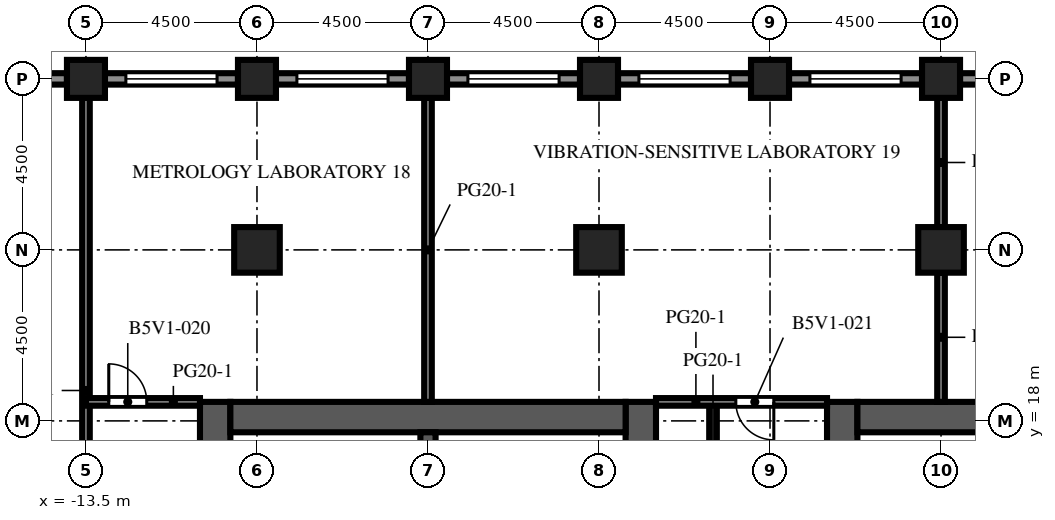
"""IFC4 building model, lengths in metres.
Left out: names, types, materials, properties, quantities, classifications, styles, units other than length and angle.
Written with IfcOpenShell. Run it as: python <this file> out.ifc"""

import sys

from ifc_helpers import new_model, si_unit, direction, frame, frame_2d, origin, origin_2d, place, context, subcontext, project, spatial, rectangle, extrude, element, fill, save


model = new_model("IFC4")
c1 = context("Model", 3, precision=1e-05, world=origin(), true_north=direction((0.0, 1.0)))
c2 = subcontext(c1, "Body", "Model", "MODEL_VIEW")
j1 = project(units=[si_unit("LENGTHUNIT", "METRE"), si_unit("PLANEANGLEUNIT", "RADIAN")], contexts=[c1])
p1 = place(None, origin())
s1 = spatial("IfcSite", under=j1, at=p1, CompositionType="ELEMENT")
p2 = place(p1, origin())
s2 = spatial("IfcBuilding", under=s1, at=p2, CompositionType="ELEMENT")
p3 = place(p2, frame((0.0, 0.0, 169.1)))
s3 = spatial("IfcBuildingStorey", under=s2, at=p3, CompositionType="ELEMENT", Elevation=169.1)
for number, where, z_axis, x_axis in (
    (1, (-13.5, 27.0, 0.0), (0.0, 0.0, 1.0), (1.0, 0.0, 0.0)),
    (2, (-9.0, 27.0, 0.0), (0.0, 0.0, 1.0), (1.0, 0.0, 0.0)),
    (3, (-4.5, 27.0, 0.0), (0.0, 0.0, 1.0), (1.0, 0.0, 0.0)),
    (4, (0.0, 27.0, 0.0), (0.0, 0.0, 1.0), (1.0, 0.0, 0.0)),
    (5, (4.5, 27.0, 0.0), (0.0, 0.0, 1.0), (1.0, 0.0, 0.0)),
    (6, (9.0, 27.0, 0.0), (0.0, 0.0, 1.0), (1.0, 0.0, 0.0)),
):
    element("IfcColumn", number, at=place(p3, frame(where, z_axis=z_axis, x_axis=x_axis)), inside=s3, PredefinedType="COLUMN", context=c2, shape_type="SweptSolid", body=[
        extrude(rectangle(XDim=1.0, YDim=1.0, at=origin_2d()), origin(), (0.0, 0.0, 1.0), 4.1),
    ])
for number, where, z_axis, x_axis in (
    (7, (-9.0, 22.5, 0.0), (0.0, 0.0, 1.0), (1.0, 0.0, 0.0)),
    (8, (0.0, 22.5, 0.0), (0.0, 0.0, 1.0), (1.0, 0.0, 0.0)),
    (9, (9.0, 22.5, 0.0), (0.0, 0.0, 1.0), (1.0, 0.0, 0.0)),
):
    element("IfcColumn", number, at=place(p3, frame(where, z_axis=z_axis, x_axis=x_axis)), inside=s3, PredefinedType="COLUMN", context=c2, shape_type="SweptSolid", body=[
        extrude(rectangle(XDim=1.2, YDim=1.2, at=origin_2d()), origin(), (0.0, 0.0, 1.0), 4.1),
    ])
p4 = place(p3, frame((-10.1, -9.0, 0.0), z_axis=(0.0, 0.0, 1.0), x_axis=(0.0, 1.0, 0.0)))
e10 = element("IfcWall", 10, at=p4, inside=s3, PredefinedType="SHEAR", context=c2, shape_type="SweptSolid", body=[
    extrude(rectangle(XDim=27.5, YDim=0.8, at=frame_2d((13.75, 0.0))), origin(), (0.0, 0.0, 1.0), 4.1),
])
p5 = place(p4, frame((12.55, 0.0, 0.0)))
e11 = element("IfcOpeningElement", 11, at=p5, cuts=e10, PredefinedType="OPENING", context=c2, shape_type="SweptSolid", body=[
    extrude(rectangle(XDim=2.4, YDim=2.4, at=frame_2d((1.2, 1.2))), frame((0.0, 0.41, 0.0), z_axis=(0.0, -1.0, 0.0), x_axis=(1.0, 0.0, 0.0)), (0.0, 0.0, 1.0), 0.82),
])
p6 = place(p4, frame((6.825, 0.0, 0.0)))
e12 = element("IfcOpeningElement", 12, at=p6, cuts=e10, PredefinedType="OPENING", context=c2, shape_type="SweptSolid", body=[
    extrude(rectangle(XDim=1.2, YDim=2.1, at=frame_2d((0.6, 1.05))), frame((0.0, 0.41, 0.0), z_axis=(0.0, -1.0, 0.0), x_axis=(1.0, 0.0, 0.0)), (0.0, 0.0, 1.0), 0.82),
])
p7 = place(p4, frame((19.475, 0.0, 0.0)))
e13 = element("IfcOpeningElement", 13, at=p7, cuts=e10, PredefinedType="OPENING", context=c2, shape_type="SweptSolid", body=[
    extrude(rectangle(XDim=1.2, YDim=2.1, at=frame_2d((0.6, 1.05))), frame((0.0, 0.41, 0.0), z_axis=(0.0, -1.0, 0.0), x_axis=(1.0, 0.0, 0.0)), (0.0, 0.0, 1.0), 0.82),
])
p8 = place(p3, frame((1.1, -9.0, 0.0), z_axis=(0.0, 0.0, 1.0), x_axis=(0.0, 1.0, 0.0)))
e14 = element("IfcWall", 14, at=p8, inside=s3, PredefinedType="SHEAR", context=c2, shape_type="SweptSolid", body=[
    extrude(rectangle(XDim=27.5, YDim=0.8, at=frame_2d((13.75, 0.0))), origin(), (0.0, 0.0, 1.0), 4.1),
])
p9 = place(p8, frame((12.55, 0.0, 0.0)))
e15 = element("IfcOpeningElement", 15, at=p9, cuts=e14, PredefinedType="OPENING", context=c2, shape_type="SweptSolid", body=[
    extrude(rectangle(XDim=2.4, YDim=2.4, at=frame_2d((1.2, 1.2))), frame((0.0, 0.41, 0.0), z_axis=(0.0, -1.0, 0.0), x_axis=(1.0, 0.0, 0.0)), (0.0, 0.0, 1.0), 0.82),
])
p10 = place(p8, frame((3.95, 0.0, 0.0)))
e16 = element("IfcOpeningElement", 16, at=p10, cuts=e14, PredefinedType="OPENING", context=c2, shape_type="SweptSolid", body=[
    extrude(rectangle(XDim=1.2, YDim=2.1, at=frame_2d((0.6, 1.05))), frame((0.0, 0.41, 0.0), z_axis=(0.0, -1.0, 0.0), x_axis=(1.0, 0.0, 0.0)), (0.0, 0.0, 1.0), 0.82),
])
p11 = place(p8, frame((22.35, 0.0, 0.0)))
e17 = element("IfcOpeningElement", 17, at=p11, cuts=e14, PredefinedType="OPENING", context=c2, shape_type="SweptSolid", body=[
    extrude(rectangle(XDim=1.2, YDim=2.1, at=frame_2d((0.6, 1.05))), frame((0.0, 0.41, 0.0), z_axis=(0.0, -1.0, 0.0), x_axis=(1.0, 0.0, 0.0)), (0.0, 0.0, 1.0), 0.82),
])
p12 = place(p3, frame((-9.7, 18.1, 0.0), z_axis=(0.0, 0.0, 1.0), x_axis=(1.0, 0.0, 0.0)))
e18 = element("IfcWall", 18, at=p12, inside=s3, PredefinedType="SHEAR", context=c2, shape_type="SweptSolid", body=[
    extrude(rectangle(XDim=10.4, YDim=0.8, at=frame_2d((5.2, 0.0))), origin(), (0.0, 0.0, 1.0), 4.1),
])
p13 = place(p3, frame((-4.5, 10.2, 0.0), z_axis=(0.0, 0.0, 1.0), x_axis=(0.0, 1.0, 0.0)))
e19 = element("IfcWall", 19, at=p13, inside=s3, PredefinedType="SHEAR", context=c2, shape_type="SweptSolid", body=[
    extrude(rectangle(XDim=7.5, YDim=0.4, at=frame_2d((3.75, 0.0))), origin(), (0.0, 0.0, 1.0), 4.1),
])
p14 = place(p3, frame((6.4, -9.0, 0.0), z_axis=(0.0, 0.0, 1.0), x_axis=(0.0, 1.0, 0.0)))
e20 = element("IfcWall", 20, at=p14, inside=s3, PredefinedType="SHEAR", context=c2, shape_type="SweptSolid", body=[
    extrude(rectangle(XDim=27.5, YDim=0.8, at=frame_2d((13.75, 0.0))), origin(), (0.0, 0.0, 1.0), 4.1),
])
p15 = place(p14, frame((12.55, 0.0, 0.0)))
e21 = element("IfcOpeningElement", 21, at=p15, cuts=e20, PredefinedType="OPENING", context=c2, shape_type="SweptSolid", body=[
    extrude(rectangle(XDim=2.4, YDim=2.4, at=frame_2d((1.2, 1.2))), frame((0.0, 0.41, 0.0), z_axis=(0.0, -1.0, 0.0), x_axis=(1.0, 0.0, 0.0)), (0.0, 0.0, 1.0), 0.82),
])
p16 = place(p14, frame((3.95, 0.0, 0.0)))
e22 = element("IfcOpeningElement", 22, at=p16, cuts=e20, PredefinedType="OPENING", context=c2, shape_type="SweptSolid", body=[
    extrude(rectangle(XDim=1.2, YDim=2.1, at=frame_2d((0.6, 1.05))), frame((0.0, 0.41, 0.0), z_axis=(0.0, -1.0, 0.0), x_axis=(1.0, 0.0, 0.0)), (0.0, 0.0, 1.0), 0.82),
])
p17 = place(p14, frame((22.35, 0.0, 0.0)))
e23 = element("IfcOpeningElement", 23, at=p17, cuts=e20, PredefinedType="OPENING", context=c2, shape_type="SweptSolid", body=[
    extrude(rectangle(XDim=1.2, YDim=2.1, at=frame_2d((0.6, 1.05))), frame((0.0, 0.41, 0.0), z_axis=(0.0, -1.0, 0.0), x_axis=(1.0, 0.0, 0.0)), (0.0, 0.0, 1.0), 0.82),
])
p18 = place(p3, frame((6.8, 18.1, 0.0), z_axis=(0.0, 0.0, 1.0), x_axis=(1.0, 0.0, 0.0)))
e24 = element("IfcWall", 24, at=p18, inside=s3, PredefinedType="SHEAR", context=c2, shape_type="SweptSolid", body=[
    extrude(rectangle(XDim=10.4, YDim=0.8, at=frame_2d((5.2, 0.0))), origin(), (0.0, 0.0, 1.0), 4.1),
])
p19 = place(p3, frame((9.5, 27.0, 0.0), z_axis=(0.0, 0.0, 1.0), x_axis=(1.0, 0.0, 0.0)))
e25 = element("IfcWall", 25, at=p19, inside=s3, PredefinedType="SOLIDWALL", context=c2, shape_type="SweptSolid", body=[
    extrude(rectangle(XDim=3.5, YDim=0.3, at=frame_2d((1.75, 0.0))), origin(), (0.0, 0.0, 1.0), 2.85),
])
p20 = place(p19, frame((0.55, 0.0, 0.8)))
e26 = element("IfcOpeningElement", 26, at=p20, cuts=e25, PredefinedType="OPENING", context=c2, shape_type="SweptSolid", body=[
    extrude(rectangle(XDim=2.4, YDim=1.7, at=frame_2d((1.2, 0.85))), frame((0.0, 0.16, 0.0), z_axis=(0.0, -1.0, 0.0), x_axis=(1.0, 0.0, 0.0)), (0.0, 0.0, 1.0), 0.32),
])
p21 = place(p3, frame((5.0, 27.0, 0.0), z_axis=(0.0, 0.0, 1.0), x_axis=(1.0, 0.0, 0.0)))
e27 = element("IfcWall", 27, at=p21, inside=s3, PredefinedType="SOLIDWALL", context=c2, shape_type="SweptSolid", body=[
    extrude(rectangle(XDim=3.5, YDim=0.3, at=frame_2d((1.75, 0.0))), origin(), (0.0, 0.0, 1.0), 2.85),
])
p22 = place(p21, frame((0.55, 0.0, 0.8)))
e28 = element("IfcOpeningElement", 28, at=p22, cuts=e27, PredefinedType="OPENING", context=c2, shape_type="SweptSolid", body=[
    extrude(rectangle(XDim=2.4, YDim=1.7, at=frame_2d((1.2, 0.85))), frame((0.0, 0.16, 0.0), z_axis=(0.0, -1.0, 0.0), x_axis=(1.0, 0.0, 0.0)), (0.0, 0.0, 1.0), 0.32),
])
p23 = place(p3, frame((0.5, 27.0, 0.0), z_axis=(0.0, 0.0, 1.0), x_axis=(1.0, 0.0, 0.0)))
e29 = element("IfcWall", 29, at=p23, inside=s3, PredefinedType="SOLIDWALL", context=c2, shape_type="SweptSolid", body=[
    extrude(rectangle(XDim=3.5, YDim=0.3, at=frame_2d((1.75, 0.0))), origin(), (0.0, 0.0, 1.0), 2.85),
])
p24 = place(p23, frame((0.55, 0.0, 0.8)))
e30 = element("IfcOpeningElement", 30, at=p24, cuts=e29, PredefinedType="OPENING", context=c2, shape_type="SweptSolid", body=[
    extrude(rectangle(XDim=2.4, YDim=1.7, at=frame_2d((1.2, 0.85))), frame((0.0, 0.16, 0.0), z_axis=(0.0, -1.0, 0.0), x_axis=(1.0, 0.0, 0.0)), (0.0, 0.0, 1.0), 0.32),
])
p25 = place(p3, frame((-4.0, 27.0, 0.0), z_axis=(0.0, 0.0, 1.0), x_axis=(1.0, 0.0, 0.0)))
e31 = element("IfcWall", 31, at=p25, inside=s3, PredefinedType="SOLIDWALL", context=c2, shape_type="SweptSolid", body=[
    extrude(rectangle(XDim=3.5, YDim=0.3, at=frame_2d((1.75, 0.0))), origin(), (0.0, 0.0, 1.0), 2.85),
])
p26 = place(p25, frame((0.55, 0.0, 0.8)))
e32 = element("IfcOpeningElement", 32, at=p26, cuts=e31, PredefinedType="OPENING", context=c2, shape_type="SweptSolid", body=[
    extrude(rectangle(XDim=2.4, YDim=1.7, at=frame_2d((1.2, 0.85))), frame((0.0, 0.16, 0.0), z_axis=(0.0, -1.0, 0.0), x_axis=(1.0, 0.0, 0.0)), (0.0, 0.0, 1.0), 0.32),
])
p27 = place(p3, frame((-8.5, 27.0, 0.0), z_axis=(0.0, 0.0, 1.0), x_axis=(1.0, 0.0, 0.0)))
e33 = element("IfcWall", 33, at=p27, inside=s3, PredefinedType="SOLIDWALL", context=c2, shape_type="SweptSolid", body=[
    extrude(rectangle(XDim=3.5, YDim=0.3, at=frame_2d((1.75, 0.0))), origin(), (0.0, 0.0, 1.0), 2.85),
])
p28 = place(p27, frame((0.55, 0.0, 0.8)))
e34 = element("IfcOpeningElement", 34, at=p28, cuts=e33, PredefinedType="OPENING", context=c2, shape_type="SweptSolid", body=[
    extrude(rectangle(XDim=2.4, YDim=1.7, at=frame_2d((1.2, 0.85))), frame((0.0, 0.16, 0.0), z_axis=(0.0, -1.0, 0.0), x_axis=(1.0, 0.0, 0.0)), (0.0, 0.0, 1.0), 0.32),
])
p29 = place(p3, frame((-13.0, 27.0, 0.0), z_axis=(0.0, 0.0, 1.0), x_axis=(1.0, 0.0, 0.0)))
e35 = element("IfcWall", 35, at=p29, inside=s3, PredefinedType="SOLIDWALL", context=c2, shape_type="SweptSolid", body=[
    extrude(rectangle(XDim=3.5, YDim=0.3, at=frame_2d((1.75, 0.0))), origin(), (0.0, 0.0, 1.0), 2.85),
])
p30 = place(p29, frame((0.55, 0.0, 0.8)))
e36 = element("IfcOpeningElement", 36, at=p30, cuts=e35, PredefinedType="OPENING", context=c2, shape_type="SweptSolid", body=[
    extrude(rectangle(XDim=2.4, YDim=1.7, at=frame_2d((1.2, 0.85))), frame((0.0, 0.16, 0.0), z_axis=(0.0, -1.0, 0.0), x_axis=(1.0, 0.0, 0.0)), (0.0, 0.0, 1.0), 0.32),
])
p31 = place(p3, frame((-17.5, 27.0, 0.0), z_axis=(0.0, 0.0, 1.0), x_axis=(1.0, 0.0, 0.0)))
e37 = element("IfcWall", 37, at=p31, inside=s3, PredefinedType="SOLIDWALL", context=c2, shape_type="SweptSolid", body=[
    extrude(rectangle(XDim=3.5, YDim=0.3, at=frame_2d((1.75, 0.0))), origin(), (0.0, 0.0, 1.0), 2.85),
])
p32 = place(p31, frame((1.25, 0.0, 0.0)))
e38 = element("IfcOpeningElement", 38, at=p32, cuts=e37, PredefinedType="OPENING", context=c2, shape_type="SweptSolid", body=[
    extrude(rectangle(XDim=1.0, YDim=2.2, at=frame_2d((0.5, 1.1))), frame((0.0, 0.16, 0.0), z_axis=(0.0, -1.0, 0.0), x_axis=(1.0, 0.0, 0.0)), (0.0, 0.0, 1.0), 0.32),
])
p33 = place(p3, frame((-0.7, 14.85, 0.0), z_axis=(0.0, 0.0, 1.0), x_axis=(0.0, 1.0, 0.0)))
e39 = element("IfcWall", 39, at=p33, inside=s3, PredefinedType="PARTITIONING", context=c2, shape_type="SweptSolid", body=[
    extrude(rectangle(XDim=2.85, YDim=0.1, at=frame_2d((1.425, 0.0))), origin(), (0.0, 0.0, 1.0), 3.65),
])
p34 = place(p33, frame((0.925, 0.0, 0.0)))
e40 = element("IfcOpeningElement", 40, at=p34, cuts=e39, PredefinedType="OPENING", context=c2, shape_type="SweptSolid", body=[
    extrude(rectangle(XDim=1.0, YDim=2.1, at=frame_2d((0.5, 1.05))), frame((0.0, 0.06, 0.0), z_axis=(0.0, -1.0, 0.0), x_axis=(1.0, 0.0, 0.0)), (0.0, 0.0, 1.0), 0.12),
])
p35 = place(p3, frame((8.2, 14.85, 0.0), z_axis=(0.0, 0.0, 1.0), x_axis=(0.0, 1.0, 0.0)))
e41 = element("IfcWall", 41, at=p35, inside=s3, PredefinedType="PARTITIONING", context=c2, shape_type="SweptSolid", body=[
    extrude(rectangle(XDim=2.85, YDim=0.1, at=frame_2d((1.425, 0.0))), origin(), (0.0, 0.0, 1.0), 3.65),
])
p36 = place(p35, frame((0.925, 0.0, 0.0)))
e42 = element("IfcOpeningElement", 42, at=p36, cuts=e41, PredefinedType="OPENING", context=c2, shape_type="SweptSolid", body=[
    extrude(rectangle(XDim=1.0, YDim=2.1, at=frame_2d((0.5, 1.05))), frame((0.0, 0.06, 0.0), z_axis=(0.0, -1.0, 0.0), x_axis=(1.0, 0.0, 0.0)), (0.0, 0.0, 1.0), 0.12),
])
p37 = place(p3, frame((-13.5, 6.25, 0.0), z_axis=(0.0, 0.0, 1.0), x_axis=(0.0, 1.0, 0.0)))
e43 = element("IfcWall", 43, at=p37, inside=s3, PredefinedType="PARTITIONING", context=c2, shape_type="SweptSolid", body=[
    extrude(rectangle(XDim=20.25, YDim=0.2, at=frame_2d((10.125, 0.0))), origin(), (0.0, 0.0, 1.0), 3.65),
])
p38 = place(p37, frame((3.85, 0.0, 0.0)))
e44 = element("IfcOpeningElement", 44, at=p38, cuts=e43, PredefinedType="OPENING", context=c2, shape_type="SweptSolid", body=[
    extrude(rectangle(XDim=1.0, YDim=2.1, at=frame_2d((0.5, 1.05))), frame((0.0, 0.11, 0.0), z_axis=(0.0, -1.0, 0.0), x_axis=(1.0, 0.0, 0.0)), (0.0, 0.0, 1.0), 0.22),
])
p39 = place(p3, frame((-4.5, 18.5, 0.0), z_axis=(0.0, 0.0, 1.0), x_axis=(0.0, 1.0, 0.0)))
e45 = element("IfcWall", 45, at=p39, inside=s3, PredefinedType="PARTITIONING", context=c2, shape_type="SweptSolid", body=[
    extrude(rectangle(XDim=8.0, YDim=0.2, at=frame_2d((4.0, 0.0))), origin(), (0.0, 0.0, 1.0), 3.65),
])
p40 = place(p3, frame((3.0, 6.7, 0.0), z_axis=(0.0, 0.0, 1.0), x_axis=(0.0, 1.0, 0.0)))
e46 = element("IfcWall", 46, at=p40, inside=s3, PredefinedType="PARTITIONING", context=c2, shape_type="SweptSolid", body=[
    extrude(rectangle(XDim=11.8, YDim=0.2, at=frame_2d((5.9, 0.0))), origin(), (0.0, 0.0, 1.0), 3.65),
])
p41 = place(p40, frame((5.35, 0.0, 0.0)))
e47 = element("IfcOpeningElement", 47, at=p41, cuts=e46, PredefinedType="OPENING", context=c2, shape_type="SweptSolid", body=[
    extrude(rectangle(XDim=1.0, YDim=2.1, at=frame_2d((0.5, 1.05))), frame((0.0, 0.11, 0.0), z_axis=(0.0, -1.0, 0.0), x_axis=(1.0, 0.0, 0.0)), (0.0, 0.0, 1.0), 0.22),
])
for number, where, z_axis, x_axis in (
    (48, (9.0, 18.5, 0.0), (0.0, 0.0, 1.0), (0.0, 1.0, 0.0)),
    (49, (9.0, 23.1, 0.0), (0.0, 0.0, 1.0), (0.0, 1.0, 0.0)),
):
    element("IfcWall", number, at=place(p3, frame(where, z_axis=z_axis, x_axis=x_axis)), inside=s3, PredefinedType="PARTITIONING", context=c2, shape_type="SweptSolid", body=[
        extrude(rectangle(XDim=3.4, YDim=0.2, at=frame_2d((1.7, 0.0))), origin(), (0.0, 0.0, 1.0), 3.65),
    ])
p42 = place(p3, frame((-13.5, 18.5, 0.0), z_axis=(0.0, 0.0, 1.0), x_axis=(1.0, 0.0, 0.0)))
e50 = element("IfcWall", 50, at=p42, inside=s3, PredefinedType="PARTITIONING", context=c2, shape_type="SweptSolid", body=[
    extrude(rectangle(XDim=3.0, YDim=0.2, at=frame_2d((1.5, 0.0))), origin(), (0.0, 0.0, 1.0), 3.65),
])
p43 = place(p42, frame((0.6, 0.0, 0.0)))
e51 = element("IfcOpeningElement", 51, at=p43, cuts=e50, PredefinedType="OPENING", context=c2, shape_type="SweptSolid", body=[
    extrude(rectangle(XDim=1.0, YDim=2.1, at=frame_2d((0.5, 1.05))), frame((0.0, 0.11, 0.0), z_axis=(0.0, -1.0, 0.0), x_axis=(1.0, 0.0, 0.0)), (0.0, 0.0, 1.0), 0.22),
])
p44 = place(p3, frame((1.5, 18.5, 0.0), z_axis=(0.0, 0.0, 1.0), x_axis=(1.0, 0.0, 0.0)))
e52 = element("IfcWall", 52, at=p44, inside=s3, PredefinedType="PARTITIONING", context=c2, shape_type="SweptSolid", body=[
    extrude(rectangle(XDim=4.5, YDim=0.2, at=frame_2d((2.25, 0.0))), origin(), (0.0, 0.0, 1.0), 3.65),
])
p45 = place(p44, frame((2.1, 0.0, 0.0)))
e53 = element("IfcOpeningElement", 53, at=p45, cuts=e52, PredefinedType="OPENING", context=c2, shape_type="SweptSolid", body=[
    extrude(rectangle(XDim=1.0, YDim=2.1, at=frame_2d((0.5, 1.05))), frame((0.0, 0.11, 0.0), z_axis=(0.0, -1.0, 0.0), x_axis=(1.0, 0.0, 0.0)), (0.0, 0.0, 1.0), 0.22),
])
p46 = place(p22, origin())
e54 = element("IfcWindow", 54, at=p46, inside=s3, PartitioningType="SINGLE_PANEL", PredefinedType="WINDOW", context=c2, shape_type="SweptSolid", body=[
    extrude(rectangle(XDim=2.4, YDim=1.7, at=frame_2d((1.2, 0.85))), frame((0.0, 0.03, 0.0), z_axis=(0.0, -1.0, 0.0), x_axis=(1.0, 0.0, 0.0)), (0.0, 0.0, 1.0), 0.06),
])
fill(e28, e54)
p47 = place(p24, origin())
e55 = element("IfcWindow", 55, at=p47, inside=s3, PartitioningType="SINGLE_PANEL", PredefinedType="WINDOW", context=c2, shape_type="SweptSolid", body=[
    extrude(rectangle(XDim=2.4, YDim=1.7, at=frame_2d((1.2, 0.85))), frame((0.0, 0.03, 0.0), z_axis=(0.0, -1.0, 0.0), x_axis=(1.0, 0.0, 0.0)), (0.0, 0.0, 1.0), 0.06),
])
fill(e30, e55)
p48 = place(p26, origin())
e56 = element("IfcWindow", 56, at=p48, inside=s3, PartitioningType="SINGLE_PANEL", PredefinedType="WINDOW", context=c2, shape_type="SweptSolid", body=[
    extrude(rectangle(XDim=2.4, YDim=1.7, at=frame_2d((1.2, 0.85))), frame((0.0, 0.03, 0.0), z_axis=(0.0, -1.0, 0.0), x_axis=(1.0, 0.0, 0.0)), (0.0, 0.0, 1.0), 0.06),
])
fill(e32, e56)
p49 = place(p28, origin())
e57 = element("IfcWindow", 57, at=p49, inside=s3, PartitioningType="SINGLE_PANEL", PredefinedType="WINDOW", context=c2, shape_type="SweptSolid", body=[
    extrude(rectangle(XDim=2.4, YDim=1.7, at=frame_2d((1.2, 0.85))), frame((0.0, 0.03, 0.0), z_axis=(0.0, -1.0, 0.0), x_axis=(1.0, 0.0, 0.0)), (0.0, 0.0, 1.0), 0.06),
])
fill(e34, e57)
p50 = place(p30, origin())
e58 = element("IfcWindow", 58, at=p50, inside=s3, PartitioningType="SINGLE_PANEL", PredefinedType="WINDOW", context=c2, shape_type="SweptSolid", body=[
    extrude(rectangle(XDim=2.4, YDim=1.7, at=frame_2d((1.2, 0.85))), frame((0.0, 0.03, 0.0), z_axis=(0.0, -1.0, 0.0), x_axis=(1.0, 0.0, 0.0)), (0.0, 0.0, 1.0), 0.06),
])
fill(e36, e58)
p51 = place(p43, origin())
e59 = element("IfcDoor", 59, at=p51, inside=s3, OperationType="SINGLE_SWING_LEFT", PredefinedType="DOOR", context=c2, shape_type="SweptSolid", body=[
    extrude(rectangle(XDim=1.0, YDim=2.1, at=frame_2d((0.5, 1.05))), frame((0.0, 0.025, 0.0), z_axis=(0.0, -1.0, 0.0), x_axis=(1.0, 0.0, 0.0)), (0.0, 0.0, 1.0), 0.05),
])
fill(e51, e59)
p52 = place(p45, origin())
e60 = element("IfcDoor", 60, at=p52, inside=s3, OperationType="SINGLE_SWING_RIGHT", PredefinedType="DOOR", context=c2, shape_type="SweptSolid", body=[
    extrude(rectangle(XDim=1.0, YDim=2.1, at=frame_2d((0.5, 1.05))), frame((0.0, 0.025, 0.0), z_axis=(0.0, -1.0, 0.0), x_axis=(1.0, 0.0, 0.0)), (0.0, 0.0, 1.0), 0.05),
])
fill(e53, e60)
save(model, sys.argv[1])
